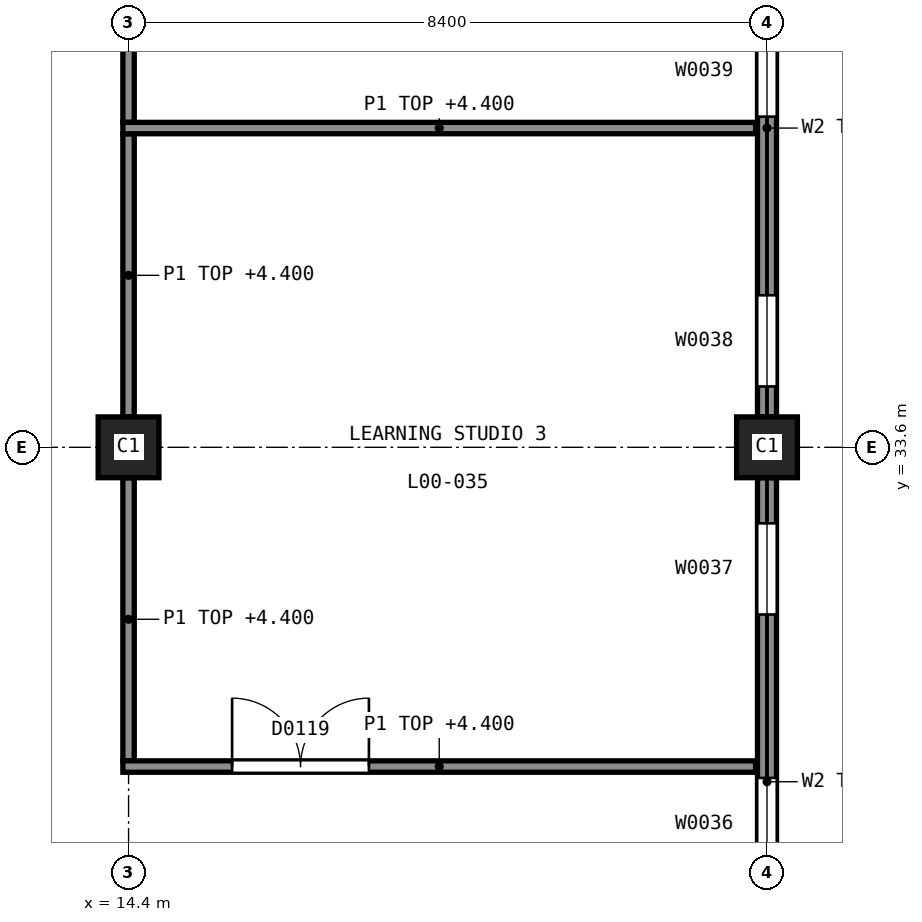
"""IFC4 building model, lengths in metres.
Left out: names, types, materials, properties, quantities, classifications, styles, units other than length and angle.
Written with IfcOpenShell. Run it as: python <this file> out.ifc"""

import sys

from ifc_helpers import new_model, si_unit, direction, frame, frame_2d, origin, origin_2d, place, context, subcontext, project, spatial, rectangle, extrude, element, fill, save


model = new_model("IFC4")
c1 = context("Model", 3, precision=1e-05, world=origin(), true_north=direction((0.0, 1.0)))
c2 = subcontext(c1, "Body", "Model", "MODEL_VIEW")
j1 = project(units=[si_unit("LENGTHUNIT", "METRE"), si_unit("PLANEANGLEUNIT", "RADIAN")], contexts=[c1])
p1 = place(None, origin())
s1 = spatial("IfcSite", under=j1, at=p1, CompositionType="ELEMENT")
p2 = place(p1, origin())
s2 = spatial("IfcBuilding", under=s1, at=p2, CompositionType="ELEMENT")
p3 = place(p2, origin())
s3 = spatial("IfcBuildingStorey", under=s2, at=p3, CompositionType="ELEMENT", Elevation=0.0)
for number, where, z_axis, x_axis in (
    (1, (14.4, 33.6, -0.3), (0.0, 0.0, 1.0), (1.0, 0.0, 0.0)),
    (2, (22.8, 33.6, -0.3), (0.0, 0.0, 1.0), (1.0, 0.0, 0.0)),
):
    element("IfcColumn", number, at=place(p3, frame(where, z_axis=z_axis, x_axis=x_axis)), inside=s3, PredefinedType="COLUMN", context=c2, shape_type="SweptSolid", body=[
        extrude(rectangle(XDim=0.8, YDim=0.8, at=origin_2d()), origin(), (0.0, 0.0, 1.0), 5.8),
    ])
p4 = place(p3, frame((22.8, 25.2, 0.0), z_axis=(0.0, 0.0, 1.0), x_axis=(0.0, 1.0, 0.0)))
e3 = element("IfcWall", 3, at=p4, inside=s3, PredefinedType="SOLIDWALL", context=c2, shape_type="SweptSolid", body=[
    extrude(rectangle(XDim=8.0, YDim=0.25, at=frame_2d((4.0, 0.0))), origin(), (0.0, 0.0, 1.0), 4.44),
])
p5 = place(p4, frame((0.6, 0.0, 0.9)))
e4 = element("IfcOpeningElement", 4, at=p5, cuts=e3, PredefinedType="OPENING", context=c2, shape_type="SweptSolid", body=[
    extrude(rectangle(XDim=1.2, YDim=2.1, at=frame_2d((0.6, 1.05))), frame((0.0, 0.135, 0.0), z_axis=(0.0, -1.0, 0.0), x_axis=(1.0, 0.0, 0.0)), (0.0, 0.0, 1.0), 0.27),
])
p6 = place(p4, frame((2.85, 0.0, 0.9)))
e5 = element("IfcOpeningElement", 5, at=p6, cuts=e3, PredefinedType="OPENING", context=c2, shape_type="SweptSolid", body=[
    extrude(rectangle(XDim=1.2, YDim=2.1, at=frame_2d((0.6, 1.05))), frame((0.0, 0.135, 0.0), z_axis=(0.0, -1.0, 0.0), x_axis=(1.0, 0.0, 0.0)), (0.0, 0.0, 1.0), 0.27),
])
p7 = place(p4, frame((6.2, 0.0, 0.9)))
e6 = element("IfcOpeningElement", 6, at=p7, cuts=e3, PredefinedType="OPENING", context=c2, shape_type="SweptSolid", body=[
    extrude(rectangle(XDim=1.2, YDim=2.1, at=frame_2d((0.6, 1.05))), frame((0.0, 0.135, 0.0), z_axis=(0.0, -1.0, 0.0), x_axis=(1.0, 0.0, 0.0)), (0.0, 0.0, 1.0), 0.27),
])
p8 = place(p3, frame((22.8, 34.0, 0.0), z_axis=(0.0, 0.0, 1.0), x_axis=(0.0, 1.0, 0.0)))
e7 = element("IfcWall", 7, at=p8, inside=s3, PredefinedType="SOLIDWALL", context=c2, shape_type="SweptSolid", body=[
    extrude(rectangle(XDim=7.6, YDim=0.25, at=frame_2d((3.8, 0.0))), origin(), (0.0, 0.0, 1.0), 4.44),
])
p9 = place(p8, frame((0.4, 0.0, 0.9)))
e8 = element("IfcOpeningElement", 8, at=p9, cuts=e7, PredefinedType="OPENING", context=c2, shape_type="SweptSolid", body=[
    extrude(rectangle(XDim=1.2, YDim=2.1, at=frame_2d((0.6, 1.05))), frame((0.0, 0.135, 0.0), z_axis=(0.0, -1.0, 0.0), x_axis=(1.0, 0.0, 0.0)), (0.0, 0.0, 1.0), 0.27),
])
p10 = place(p8, frame((3.95, 0.0, 0.9)))
e9 = element("IfcOpeningElement", 9, at=p10, cuts=e7, PredefinedType="OPENING", context=c2, shape_type="SweptSolid", body=[
    extrude(rectangle(XDim=1.2, YDim=2.1, at=frame_2d((0.6, 1.05))), frame((0.0, 0.135, 0.0), z_axis=(0.0, -1.0, 0.0), x_axis=(1.0, 0.0, 0.0)), (0.0, 0.0, 1.0), 0.27),
])
p11 = place(p8, frame((6.0, 0.0, 0.9)))
e10 = element("IfcOpeningElement", 10, at=p11, cuts=e7, PredefinedType="OPENING", context=c2, shape_type="SweptSolid", body=[
    extrude(rectangle(XDim=1.2, YDim=2.1, at=frame_2d((0.6, 1.05))), frame((0.0, 0.135, 0.0), z_axis=(0.0, -1.0, 0.0), x_axis=(1.0, 0.0, 0.0)), (0.0, 0.0, 1.0), 0.27),
])
p12 = place(p3, frame((14.4, 37.875, 0.0), z_axis=(0.0, 0.0, 1.0), x_axis=(0.0, 1.0, 0.0)))
e11 = element("IfcWall", 11, at=p12, inside=s3, PredefinedType="PARTITIONING", context=c2, shape_type="SweptSolid", body=[
    extrude(rectangle(XDim=3.725, YDim=0.15, at=frame_2d((1.863, 0.0))), origin(), (0.0, 0.0, 1.0), 4.4),
])
p13 = place(p3, frame((14.4, 29.475, 0.0), z_axis=(0.0, 0.0, 1.0), x_axis=(0.0, 1.0, 0.0)))
e12 = element("IfcWall", 12, at=p13, inside=s3, PredefinedType="PARTITIONING", context=c2, shape_type="SweptSolid", body=[
    extrude(rectangle(XDim=3.725, YDim=0.15, at=frame_2d((1.862, 0.0))), origin(), (0.0, 0.0, 1.0), 4.4),
])
p14 = place(p3, frame((14.4, 34.0, 0.0), z_axis=(0.0, 0.0, 1.0), x_axis=(0.0, 1.0, 0.0)))
e13 = element("IfcWall", 13, at=p14, inside=s3, PredefinedType="PARTITIONING", context=c2, shape_type="SweptSolid", body=[
    extrude(rectangle(XDim=3.725, YDim=0.15, at=frame_2d((1.863, 0.0))), origin(), (0.0, 0.0, 1.0), 4.4),
])
p15 = place(p3, frame((14.325, 29.4, 0.0), z_axis=(0.0, 0.0, 1.0), x_axis=(1.0, 0.0, 0.0)))
e14 = element("IfcWall", 14, at=p15, inside=s3, PredefinedType="PARTITIONING", context=c2, shape_type="SweptSolid", body=[
    extrude(rectangle(XDim=8.325, YDim=0.15, at=frame_2d((4.163, 0.0))), origin(), (0.0, 0.0, 1.0), 4.4),
])
p16 = place(p15, frame((1.438, 0.0, 0.0)))
e15 = element("IfcOpeningElement", 15, at=p16, cuts=e14, PredefinedType="OPENING", context=c2, shape_type="SweptSolid", body=[
    extrude(rectangle(XDim=1.8, YDim=2.1, at=frame_2d((0.9, 1.05))), frame((0.0, 0.085, 0.0), z_axis=(0.0, -1.0, 0.0), x_axis=(1.0, 0.0, 0.0)), (0.0, 0.0, 1.0), 0.17),
])
p17 = place(p3, frame((14.325, 37.8, 0.0), z_axis=(0.0, 0.0, 1.0), x_axis=(1.0, 0.0, 0.0)))
e16 = element("IfcWall", 16, at=p17, inside=s3, PredefinedType="PARTITIONING", context=c2, shape_type="SweptSolid", body=[
    extrude(rectangle(XDim=8.325, YDim=0.15, at=frame_2d((4.163, 0.0))), origin(), (0.0, 0.0, 1.0), 4.4),
])
p18 = place(p6, origin())
e17 = element("IfcWindow", 17, at=p18, inside=s3, PartitioningType="SINGLE_PANEL", PredefinedType="WINDOW", context=c2, shape_type="SweptSolid", body=[
    extrude(rectangle(XDim=1.2, YDim=2.1, at=frame_2d((0.6, 1.05))), frame((0.0, 0.105, 0.0), z_axis=(0.0, -1.0, 0.0), x_axis=(1.0, 0.0, 0.0)), (0.0, 0.0, 1.0), 0.06),
])
fill(e5, e17)
p19 = place(p7, origin())
e18 = element("IfcWindow", 18, at=p19, inside=s3, PartitioningType="SINGLE_PANEL", PredefinedType="WINDOW", context=c2, shape_type="SweptSolid", body=[
    extrude(rectangle(XDim=1.2, YDim=2.1, at=frame_2d((0.6, 1.05))), frame((0.0, 0.105, 0.0), z_axis=(0.0, -1.0, 0.0), x_axis=(1.0, 0.0, 0.0)), (0.0, 0.0, 1.0), 0.06),
])
fill(e6, e18)
p20 = place(p9, origin())
e19 = element("IfcWindow", 19, at=p20, inside=s3, PartitioningType="SINGLE_PANEL", PredefinedType="WINDOW", context=c2, shape_type="SweptSolid", body=[
    extrude(rectangle(XDim=1.2, YDim=2.1, at=frame_2d((0.6, 1.05))), frame((0.0, 0.105, 0.0), z_axis=(0.0, -1.0, 0.0), x_axis=(1.0, 0.0, 0.0)), (0.0, 0.0, 1.0), 0.06),
])
fill(e8, e19)
p21 = place(p10, origin())
e20 = element("IfcWindow", 20, at=p21, inside=s3, PartitioningType="SINGLE_PANEL", PredefinedType="WINDOW", context=c2, shape_type="SweptSolid", body=[
    extrude(rectangle(XDim=1.2, YDim=2.1, at=frame_2d((0.6, 1.05))), frame((0.0, 0.105, 0.0), z_axis=(0.0, -1.0, 0.0), x_axis=(1.0, 0.0, 0.0)), (0.0, 0.0, 1.0), 0.06),
])
fill(e9, e20)
p22 = place(p16, origin())
e21 = element("IfcDoor", 21, at=p22, inside=s3, OperationType="DOUBLE_DOOR_SINGLE_SWING", PredefinedType="DOOR", context=c2, shape_type="SweptSolid", body=[
    extrude(rectangle(XDim=1.8, YDim=2.1, at=frame_2d((0.9, 1.05))), frame((0.0, 0.025, 0.0), z_axis=(0.0, -1.0, 0.0), x_axis=(1.0, 0.0, 0.0)), (0.0, 0.0, 1.0), 0.05),
])
fill(e15, e21)
save(model, sys.argv[1])
